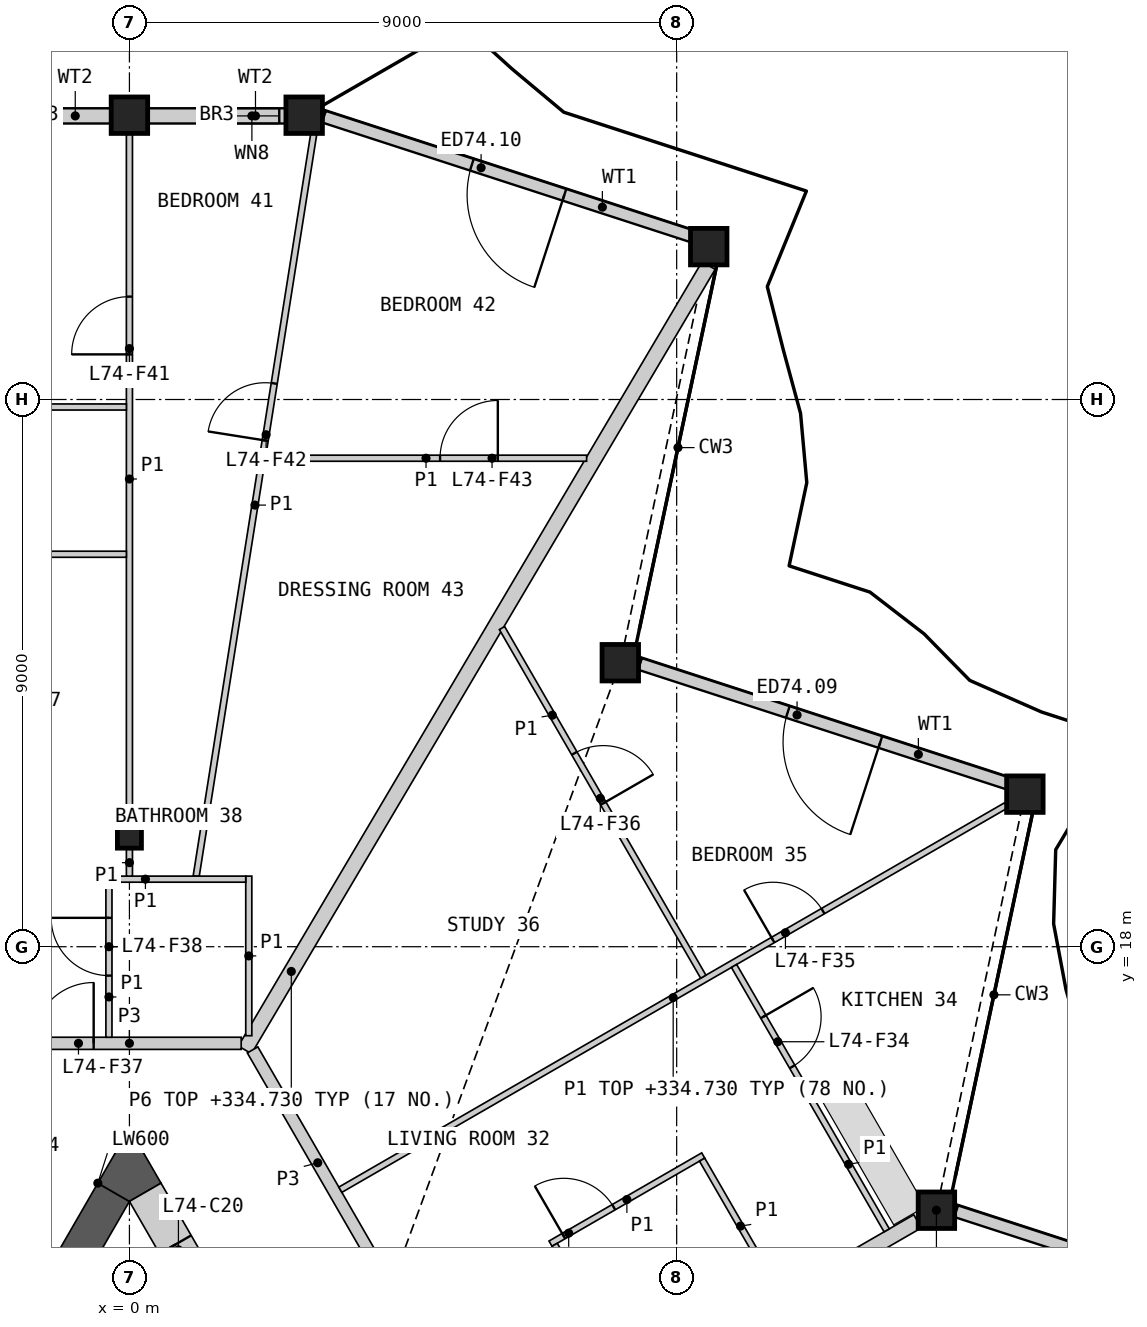
"""IFC4 building model, lengths in metres.
Left out: names, types, materials, properties, quantities, classifications, styles, units other than length and angle.
Written with IfcOpenShell. Run it as: python <this file> out.ifc"""

import sys

from ifc_helpers import new_model, si_unit, direction, frame, frame_2d, origin, origin_2d, place, context, subcontext, project, spatial, polyline, rectangle, hollow_rectangle, i_section, outline, extrude, element, fill, save


model = new_model("IFC4")
c1 = context("Model", 3, precision=1e-05, world=origin(), true_north=direction((0.0, 1.0)))
c2 = subcontext(c1, "Body", "Model", "MODEL_VIEW")
j1 = project(units=[si_unit("LENGTHUNIT", "METRE"), si_unit("PLANEANGLEUNIT", "RADIAN")], contexts=[c1])
p1 = place(None, origin())
s1 = spatial("IfcSite", under=j1, at=p1, CompositionType="ELEMENT")
p2 = place(p1, origin())
s2 = spatial("IfcBuilding", under=s1, at=p2, CompositionType="ELEMENT")
p3 = place(p2, frame((0.0, 0.0, 332.4)))
s3 = spatial("IfcBuildingStorey", under=s2, at=p3, CompositionType="ELEMENT", Elevation=332.4)
for number, where, z_axis, x_axis in (
    (1, (13.272, 13.666, 0.0), (0.0, 0.0, 1.0), (1.0, 0.0, 0.0)),
    (2, (14.727, 20.509, 0.0), (0.0, 0.0, 1.0), (1.0, 0.0, 0.0)),
    (3, (8.073, 22.671, 0.0), (0.0, 0.0, 1.0), (1.0, 0.0, 0.0)),
    (4, (9.527, 29.514, 0.0), (0.0, 0.0, 1.0), (1.0, 0.0, 0.0)),
    (5, (2.874, 31.676, 0.0), (0.0, 0.0, 1.0), (1.0, 0.0, 0.0)),
    (6, (0.0, 31.676, 0.0), (0.0, 0.0, 1.0), (1.0, 0.0, 0.0)),
):
    element("IfcColumn", number, at=place(p3, frame(where, z_axis=z_axis, x_axis=x_axis)), inside=s3, PredefinedType="COLUMN", context=c2, shape_type="SweptSolid", body=[
        extrude(hollow_rectangle(XDim=0.6, YDim=0.6, WallThickness=0.04, at=origin_2d()), origin(), (0.0, 0.0, 1.0), 3.4),
    ])
p4 = place(p3, frame((0.0, 19.811, 0.0), z_axis=(0.0, 0.0, 1.0), x_axis=(1.0, 0.0, 0.0)))
e7 = element("IfcColumn", 7, at=p4, inside=s3, PredefinedType="COLUMN", context=c2, shape_type="SweptSolid", body=[
    extrude(i_section(OverallWidth=0.396, OverallDepth=0.381, WebThickness=0.019, FlangeThickness=0.03, at=origin_2d()), origin(), (0.0, 0.0, 1.0), 3.4),
])
p5 = place(p3, frame((19.697, 11.667, 0.0), z_axis=(0.0, 0.0, 1.0), x_axis=(-0.951053926112, 0.309024966026, 0.0)))
e8 = element("IfcWall", 8, at=p5, inside=s3, PredefinedType="SOLIDWALL", context=c2, shape_type="SweptSolid", body=[
    extrude(rectangle(XDim=6.414, YDim=0.2, at=frame_2d((3.207, 0.0))), origin(), (0.0, 0.0, 1.0), 2.488),
])
p6 = place(p5, frame((2.262, 0.0, 0.0)))
e9 = element("IfcOpeningElement", 9, at=p6, cuts=e8, PredefinedType="OPENING", context=c2, shape_type="SweptSolid", body=[
    extrude(rectangle(XDim=1.6, YDim=2.25, at=frame_2d((0.8, 1.125))), frame((0.0, 0.11, 0.0), z_axis=(0.0, -1.0, 0.0), x_axis=(1.0, 0.0, 0.0)), (0.0, 0.0, 1.0), 0.22),
])
p7 = place(p3, frame((14.501, 20.667, 0.0), z_axis=(0.0, 0.0, 1.0), x_axis=(-0.951049165164, 0.309039617915, 0.0)))
e10 = element("IfcWall", 10, at=p7, inside=s3, PredefinedType="SOLIDWALL", context=c2, shape_type="SweptSolid", body=[
    extrude(rectangle(XDim=6.417, YDim=0.2, at=frame_2d((3.208, 0.0))), origin(), (0.0, 0.0, 1.0), 2.488),
])
p8 = place(p7, frame((2.262, 0.0, 0.0)))
e11 = element("IfcOpeningElement", 11, at=p8, cuts=e10, PredefinedType="OPENING", context=c2, shape_type="SweptSolid", body=[
    extrude(rectangle(XDim=1.6, YDim=2.25, at=frame_2d((0.8, 1.125))), frame((0.0, 0.11, 0.0), z_axis=(0.0, -1.0, 0.0), x_axis=(1.0, 0.0, 0.0)), (0.0, 0.0, 1.0), 0.22),
])
p9 = place(p3, frame((9.304, 29.668, 0.0), z_axis=(0.0, 0.0, 1.0), x_axis=(-0.951059216388, 0.309008684221, 0.0)))
e12 = element("IfcWall", 12, at=p9, inside=s3, PredefinedType="SOLIDWALL", context=c2, shape_type="SweptSolid", body=[
    extrude(rectangle(XDim=6.42, YDim=0.2, at=frame_2d((3.21, 0.0))), origin(), (0.0, 0.0, 1.0), 2.488),
])
p10 = place(p9, frame((2.262, 0.0, 0.0)))
e13 = element("IfcOpeningElement", 13, at=p10, cuts=e12, PredefinedType="OPENING", context=c2, shape_type="SweptSolid", body=[
    extrude(rectangle(XDim=1.6, YDim=2.25, at=frame_2d((0.8, 1.125))), frame((0.0, 0.11, 0.0), z_axis=(0.0, -1.0, 0.0), x_axis=(1.0, 0.0, 0.0)), (0.0, 0.0, 1.0), 0.22),
])
p11 = place(p3, frame((2.664, 31.664, 0.0), z_axis=(0.0, 0.0, 1.0), x_axis=(-1.0, 0.0, 0.0)))
e14 = element("IfcWall", 14, at=p11, inside=s3, PredefinedType="SOLIDWALL", context=c2, shape_type="SweptSolid", body=[
    extrude(rectangle(XDim=2.364, YDim=0.25, at=frame_2d((1.182, 0.0))), origin(), (0.0, 0.0, 1.0), 2.488),
])
p12 = place(p11, frame((0.2, 0.0, 1.5)))
e15 = element("IfcOpeningElement", 15, at=p12, cuts=e14, PredefinedType="OPENING", context=c2, shape_type="SweptSolid", body=[
    extrude(rectangle(XDim=0.9, YDim=0.7, at=frame_2d((0.45, 0.35))), frame((0.0, 0.135, 0.0), z_axis=(0.0, -1.0, 0.0), x_axis=(1.0, 0.0, 0.0)), (0.0, 0.0, 1.0), 0.27),
])
p13 = place(p3, frame((-0.3, 31.664, 0.0), z_axis=(0.0, 0.0, 1.0), x_axis=(-1.0, 0.0, 0.0)))
e16 = element("IfcWall", 16, at=p13, inside=s3, PredefinedType="SOLIDWALL", context=c2, shape_type="SweptSolid", body=[
    extrude(rectangle(XDim=2.364, YDim=0.25, at=frame_2d((1.182, 0.0))), origin(), (0.0, 0.0, 1.0), 2.488),
])
p14 = place(p3, frame((-0.26, 13.961, 0.0), z_axis=(0.0, 0.0, 1.0), x_axis=(-0.499980485389, -0.866036670257, 0.0)))
e17 = element("IfcWall", 17, at=p14, inside=s3, PredefinedType="SHEAR", context=c2, shape_type="SweptSolid", body=[
    extrude(rectangle(XDim=4.559, YDim=0.6, at=frame_2d((2.28, 0.0))), origin(), (0.0, 0.0, 1.0), 3.1),
])
p15 = place(p3, origin())
e18 = element("IfcWall", 18, at=p15, inside=s3, PredefinedType="SHEAR", context=c2, shape_type="SweptSolid", body=[
    extrude(outline(polyline([(-0.52, 14.111), (0.0, 15.011), (0.52, 14.111), (0.0, 13.811), (-0.52, 14.111)])), origin(), (0.0, 0.0, 1.0), 3.1),
])
p16 = place(p3, frame((1.556, 11.716, 0.0), z_axis=(0.0, 0.0, 1.0), x_axis=(-0.500018667571, 0.866014625789, 0.0)))
e19 = element("IfcWall", 19, at=p16, inside=s3, PredefinedType="SHEAR", context=c2, shape_type="SweptSolid", body=[
    extrude(rectangle(XDim=2.592, YDim=0.6, at=frame_2d((1.296, 0.0))), origin(), (0.0, 0.0, 1.0), 3.1),
])
p17 = place(p16, frame((0.6, 0.0, 0.0)))
e20 = element("IfcOpeningElement", 20, at=p17, cuts=e19, PredefinedType="OPENING", context=c2, shape_type="SweptSolid", body=[
    extrude(rectangle(XDim=1.0, YDim=2.1, at=frame_2d((0.5, 1.05))), frame((0.0, 0.31, 0.0), z_axis=(0.0, -1.0, 0.0), x_axis=(1.0, 0.0, 0.0)), (0.0, 0.0, 1.0), 0.62),
])
p18 = place(p3, frame((1.899, 16.303, 0.0), z_axis=(0.0, 0.0, 1.0), x_axis=(0.508895604687, 0.860828242758, 0.0)))
e21 = element("IfcWall", 21, at=p18, inside=s3, PredefinedType="PARTITIONING", context=c2, shape_type="SweptSolid", body=[
    extrude(rectangle(XDim=14.986, YDim=0.25, at=frame_2d((7.493, 0.0))), origin(), (0.0, 0.0, 1.0), 2.33),
])
p19 = place(p3, frame((6.067, 9.503, 0.0), z_axis=(0.0, 0.0, 1.0), x_axis=(0.866032392051, 0.499987895772, 0.0)))
e22 = element("IfcWall", 22, at=p19, inside=s3, PredefinedType="PARTITIONING", context=c2, shape_type="SweptSolid", body=[
    extrude(rectangle(XDim=7.962, YDim=0.25, at=frame_2d((3.981, 0.0))), origin(), (0.0, 0.0, 1.0), 2.33),
])
p20 = place(p3, frame((2.025, 16.303, 0.0), z_axis=(0.0, 0.0, 1.0), x_axis=(0.499978750566, -0.866037671803, 0.0)))
e23 = element("IfcWall", 23, at=p20, inside=s3, PredefinedType="PARTITIONING", context=c2, shape_type="SweptSolid", body=[
    extrude(rectangle(XDim=4.288, YDim=0.2, at=frame_2d((2.144, 0.0))), origin(), (0.0, 0.0, 1.0), 3.1),
])
p21 = place(p3, frame((-1.838, 16.411, 0.0), z_axis=(0.0, 0.0, 1.0), x_axis=(1.0, 0.0, 0.0)))
e24 = element("IfcWall", 24, at=p21, inside=s3, PredefinedType="PARTITIONING", context=c2, shape_type="SweptSolid", body=[
    extrude(rectangle(XDim=3.676, YDim=0.2, at=frame_2d((1.838, 0.0))), origin(), (0.0, 0.0, 1.0), 3.1),
])
p22 = place(p21, frame((0.25, 0.0, 0.0)))
e25 = element("IfcOpeningElement", 25, at=p22, cuts=e24, PredefinedType="OPENING", context=c2, shape_type="SweptSolid", body=[
    extrude(rectangle(XDim=1.0, YDim=2.1, at=frame_2d((0.5, 1.05))), frame((0.0, 0.11, 0.0), z_axis=(0.0, -1.0, 0.0), x_axis=(1.0, 0.0, 0.0)), (0.0, 0.0, 1.0), 0.22),
])
p23 = place(p3, frame((3.469, 14.003, 0.0), z_axis=(0.0, 0.0, 1.0), x_axis=(0.866021563384, 0.50000665171, 0.0)))
e26 = element("IfcWall", 26, at=p23, inside=s3, PredefinedType="PARTITIONING", context=c2, shape_type="SweptSolid", body=[
    extrude(rectangle(XDim=12.641, YDim=0.1, at=frame_2d((6.321, 0.0))), origin(), (0.0, 0.0, 1.0), 2.33),
])
p24 = place(p23, frame((8.215, 0.0, 0.0)))
e27 = element("IfcOpeningElement", 27, at=p24, cuts=e26, PredefinedType="OPENING", context=c2, shape_type="SweptSolid", body=[
    extrude(rectangle(XDim=0.95, YDim=2.1, at=frame_2d((0.475, 1.05))), frame((0.0, 0.06, 0.0), z_axis=(0.0, -1.0, 0.0), x_axis=(1.0, 0.0, 0.0)), (0.0, 0.0, 1.0), 0.12),
])
p25 = place(p3, frame((1.098, 19.16, 0.0), z_axis=(0.0, 0.0, 1.0), x_axis=(0.156426176129, 0.987689653394, 0.0)))
e28 = element("IfcWall", 28, at=p25, inside=s3, PredefinedType="PARTITIONING", context=c2, shape_type="SweptSolid", body=[
    extrude(rectangle(XDim=12.358, YDim=0.1, at=frame_2d((6.179, 0.0))), origin(), (0.0, 0.0, 1.0), 2.33),
])
p26 = place(p25, frame((7.255, 0.0, 0.0)))
e29 = element("IfcOpeningElement", 29, at=p26, cuts=e28, PredefinedType="OPENING", context=c2, shape_type="SweptSolid", body=[
    extrude(rectangle(XDim=0.95, YDim=2.1, at=frame_2d((0.475, 1.05))), frame((0.0, 0.06, 0.0), z_axis=(0.0, -1.0, 0.0), x_axis=(1.0, 0.0, 0.0)), (0.0, 0.0, 1.0), 0.12),
])
p27 = place(p3, frame((0.0, 20.019, 0.0), z_axis=(0.0, 0.0, 1.0), x_axis=(0.0, 1.0, 0.0)))
e30 = element("IfcWall", 30, at=p27, inside=s3, PredefinedType="PARTITIONING", context=c2, shape_type="SweptSolid", body=[
    extrude(rectangle(XDim=11.347, YDim=0.1, at=frame_2d((5.674, 0.0))), origin(), (0.0, 0.0, 1.0), 2.33),
])
p28 = place(p27, frame((7.723, 0.0, 0.0)))
e31 = element("IfcOpeningElement", 31, at=p28, cuts=e30, PredefinedType="OPENING", context=c2, shape_type="SweptSolid", body=[
    extrude(rectangle(XDim=0.95, YDim=2.1, at=frame_2d((0.475, 1.05))), frame((0.0, 0.06, 0.0), z_axis=(0.0, -1.0, 0.0), x_axis=(1.0, 0.0, 0.0)), (0.0, 0.0, 1.0), 0.12),
])
p29 = place(p3, frame((-8.005, 26.877, 0.0), z_axis=(0.0, 0.0, 1.0), x_axis=(1.0, 0.0, 0.0)))
e32 = element("IfcWall", 32, at=p29, inside=s3, PredefinedType="PARTITIONING", context=c2, shape_type="SweptSolid", body=[
    extrude(rectangle(XDim=7.955, YDim=0.1, at=frame_2d((3.978, 0.0))), origin(), (0.0, 0.0, 1.0), 2.33),
])
p30 = place(p29, frame((3.853, 0.0, 0.0)))
e33 = element("IfcOpeningElement", 33, at=p30, cuts=e32, PredefinedType="OPENING", context=c2, shape_type="SweptSolid", body=[
    extrude(rectangle(XDim=0.95, YDim=2.1, at=frame_2d((0.475, 1.05))), frame((0.0, 0.06, 0.0), z_axis=(0.0, -1.0, 0.0), x_axis=(1.0, 0.0, 0.0)), (0.0, 0.0, 1.0), 0.12),
])
p31 = place(p3, frame((6.127, 23.241, 0.0), z_axis=(0.0, 0.0, 1.0), x_axis=(0.500021410345, -0.866013042163, 0.0)))
e34 = element("IfcWall", 34, at=p31, inside=s3, PredefinedType="PARTITIONING", context=c2, shape_type="SweptSolid", body=[
    extrude(rectangle(XDim=6.621, YDim=0.1, at=frame_2d((3.311, 0.0))), origin(), (0.0, 0.0, 1.0), 2.33),
])
p32 = place(p31, frame((2.379, 0.0, 0.0)))
e35 = element("IfcOpeningElement", 35, at=p32, cuts=e34, PredefinedType="OPENING", context=c2, shape_type="SweptSolid", body=[
    extrude(rectangle(XDim=0.95, YDim=2.1, at=frame_2d((0.475, 1.05))), frame((0.0, 0.06, 0.0), z_axis=(0.0, -1.0, 0.0), x_axis=(1.0, 0.0, 0.0)), (0.0, 0.0, 1.0), 0.12),
])
p33 = place(p3, frame((-6.607, 24.455, 0.0), z_axis=(0.0, 0.0, 1.0), x_axis=(1.0, 0.0, 0.0)))
e36 = element("IfcWall", 36, at=p33, inside=s3, PredefinedType="PARTITIONING", context=c2, shape_type="SweptSolid", body=[
    extrude(rectangle(XDim=6.557, YDim=0.1, at=frame_2d((3.279, 0.0))), origin(), (0.0, 0.0, 1.0), 2.33),
])
p34 = place(p33, frame((3.555, 0.0, 0.0)))
e37 = element("IfcOpeningElement", 37, at=p34, cuts=e36, PredefinedType="OPENING", context=c2, shape_type="SweptSolid", body=[
    extrude(rectangle(XDim=0.95, YDim=2.1, at=frame_2d((0.475, 1.05))), frame((0.0, 0.06, 0.0), z_axis=(0.0, -1.0, 0.0), x_axis=(1.0, 0.0, 0.0)), (0.0, 0.0, 1.0), 0.12),
])
p35 = place(p3, frame((2.237, 26.034, 0.0), z_axis=(0.0, 0.0, 1.0), x_axis=(1.0, 0.0, 0.0)))
e38 = element("IfcWall", 38, at=p35, inside=s3, PredefinedType="PARTITIONING", context=c2, shape_type="SweptSolid", body=[
    extrude(rectangle(XDim=5.282, YDim=0.1, at=frame_2d((2.641, 0.0))), origin(), (0.0, 0.0, 1.0), 2.33),
])
p36 = place(p35, frame((2.872, 0.0, 0.0)))
e39 = element("IfcOpeningElement", 39, at=p36, cuts=e38, PredefinedType="OPENING", context=c2, shape_type="SweptSolid", body=[
    extrude(rectangle(XDim=0.95, YDim=2.1, at=frame_2d((0.475, 1.05))), frame((0.0, 0.06, 0.0), z_axis=(0.0, -1.0, 0.0), x_axis=(1.0, 0.0, 0.0)), (0.0, 0.0, 1.0), 0.12),
])
p37 = place(p3, frame((9.944, 17.684, 0.0), z_axis=(0.0, 0.0, 1.0), x_axis=(0.499972176429, -0.866041467135, 0.0)))
e40 = element("IfcWall", 40, at=p37, inside=s3, PredefinedType="PARTITIONING", context=c2, shape_type="SweptSolid", body=[
    extrude(rectangle(XDim=5.021, YDim=0.1, at=frame_2d((2.511, 0.0))), origin(), (0.0, 0.0, 1.0), 2.33),
])
p38 = place(p37, frame((0.964, 0.0, 0.0)))
e41 = element("IfcOpeningElement", 41, at=p38, cuts=e40, PredefinedType="OPENING", context=c2, shape_type="SweptSolid", body=[
    extrude(rectangle(XDim=0.95, YDim=2.1, at=frame_2d((0.475, 1.05))), frame((0.0, 0.06, 0.0), z_axis=(0.0, -1.0, 0.0), x_axis=(1.0, 0.0, 0.0)), (0.0, 0.0, 1.0), 0.12),
])
p39 = place(p3, frame((6.925, 13.116, 0.0), z_axis=(0.0, 0.0, 1.0), x_axis=(0.866032775405, 0.499987231761, 0.0)))
e42 = element("IfcWall", 42, at=p39, inside=s3, PredefinedType="PARTITIONING", context=c2, shape_type="SweptSolid", body=[
    extrude(rectangle(XDim=2.9, YDim=0.1, at=frame_2d((1.45, 0.0))), origin(), (0.0, 0.0, 1.0), 2.33),
])
p40 = place(p39, frame((0.25, 0.0, 0.0)))
e43 = element("IfcOpeningElement", 43, at=p40, cuts=e42, PredefinedType="OPENING", context=c2, shape_type="SweptSolid", body=[
    extrude(rectangle(XDim=0.95, YDim=2.1, at=frame_2d((0.475, 1.05))), frame((0.0, 0.06, 0.0), z_axis=(0.0, -1.0, 0.0), x_axis=(1.0, 0.0, 0.0)), (0.0, 0.0, 1.0), 0.12),
])
p41 = place(p3, frame((-0.337, 16.511, 0.0), z_axis=(0.0, 0.0, 1.0), x_axis=(0.0, 1.0, 0.0)))
e44 = element("IfcWall", 44, at=p41, inside=s3, PredefinedType="PARTITIONING", context=c2, shape_type="SweptSolid", body=[
    extrude(rectangle(XDim=2.65, YDim=0.1, at=frame_2d((1.325, 0.0))), origin(), (0.0, 0.0, 1.0), 2.33),
])
p42 = place(p41, frame((1.014, 0.0, 0.0)))
e45 = element("IfcOpeningElement", 45, at=p42, cuts=e44, PredefinedType="OPENING", context=c2, shape_type="SweptSolid", body=[
    extrude(rectangle(XDim=0.95, YDim=2.1, at=frame_2d((0.475, 1.05))), frame((0.0, 0.06, 0.0), z_axis=(0.0, -1.0, 0.0), x_axis=(1.0, 0.0, 0.0)), (0.0, 0.0, 1.0), 0.12),
])
p43 = place(p3, frame((1.963, 16.536, 0.0), z_axis=(0.0, 0.0, 1.0), x_axis=(0.0, 1.0, 0.0)))
e46 = element("IfcWall", 46, at=p43, inside=s3, PredefinedType="PARTITIONING", context=c2, shape_type="SweptSolid", body=[
    extrude(rectangle(XDim=2.625, YDim=0.1, at=frame_2d((1.312, 0.0))), origin(), (0.0, 0.0, 1.0), 2.33),
])
for number, where, z_axis, x_axis in (
    (47, (9.418, 14.498, 0.0), (0.0, 0.0, 1.0), (0.5, -0.866, 0.0)),
    (48, (6.994, 13.098, 0.0), (0.0, 0.0, 1.0), (0.5, -0.866, 0.0)),
):
    element("IfcWall", number, at=place(p3, frame(where, z_axis=z_axis, x_axis=x_axis)), inside=s3, PredefinedType="PARTITIONING", context=c2, shape_type="SweptSolid", body=[
        extrude(rectangle(XDim=2.525, YDim=0.1, at=frame_2d((1.262, 0.0))), origin(), (0.0, 0.0, 1.0), 2.33),
    ])
p44 = place(p3, frame((-0.287, 19.111, 0.0), z_axis=(0.0, 0.0, 1.0), x_axis=(1.0, 0.0, 0.0)))
e49 = element("IfcWall", 49, at=p44, inside=s3, PredefinedType="PARTITIONING", context=c2, shape_type="SweptSolid", body=[
    extrude(rectangle(XDim=2.2, YDim=0.1, at=frame_2d((1.1, 0.0))), origin(), (0.0, 0.0, 1.0), 2.33),
])
p45 = place(p3, frame((0.0, 19.161, 0.0), z_axis=(0.0, 0.0, 1.0), x_axis=(0.0, 1.0, 0.0)))
e50 = element("IfcWall", 50, at=p45, inside=s3, PredefinedType="PARTITIONING", context=c2, shape_type="SweptSolid", body=[
    extrude(rectangle(XDim=0.442, YDim=0.1, at=frame_2d((0.221, 0.0))), origin(), (0.0, 0.0, 1.0), 2.33),
])
p46 = place(p8, origin())
e51 = element("IfcDoor", 51, at=p46, inside=s3, OperationType="DOUBLE_DOOR_SINGLE_SWING", PredefinedType="DOOR", context=c2, shape_type="SweptSolid", body=[
    extrude(rectangle(XDim=1.6, YDim=2.25, at=frame_2d((0.8, 1.125))), frame((0.0, 0.025, 0.0), z_axis=(0.0, -1.0, 0.0), x_axis=(1.0, 0.0, 0.0)), (0.0, 0.0, 1.0), 0.05),
])
fill(e11, e51)
p47 = place(p10, origin())
e52 = element("IfcDoor", 52, at=p47, inside=s3, OperationType="DOUBLE_DOOR_SINGLE_SWING", PredefinedType="DOOR", context=c2, shape_type="SweptSolid", body=[
    extrude(rectangle(XDim=1.6, YDim=2.25, at=frame_2d((0.8, 1.125))), frame((0.0, 0.025, 0.0), z_axis=(0.0, -1.0, 0.0), x_axis=(1.0, 0.0, 0.0)), (0.0, 0.0, 1.0), 0.05),
])
fill(e13, e52)
p48 = place(p12, origin())
e53 = element("IfcWindow", 53, at=p48, inside=s3, PartitioningType="SINGLE_PANEL", PredefinedType="WINDOW", context=c2, shape_type="SweptSolid", body=[
    extrude(rectangle(XDim=0.9, YDim=0.7, at=frame_2d((0.45, 0.35))), frame((0.0, 0.03, 0.0), z_axis=(0.0, -1.0, 0.0), x_axis=(1.0, 0.0, 0.0)), (0.0, 0.0, 1.0), 0.06),
])
fill(e15, e53)
p49 = place(p17, origin())
e54 = element("IfcDoor", 54, at=p49, inside=s3, OperationType="SINGLE_SWING_RIGHT", PredefinedType="DOOR", context=c2, shape_type="SweptSolid", body=[
    extrude(rectangle(XDim=1.0, YDim=2.1, at=frame_2d((0.5, 1.05))), frame((0.0, 0.055, 0.0), z_axis=(0.0, -1.0, 0.0), x_axis=(1.0, 0.0, 0.0)), (0.0, 0.0, 1.0), 0.05),
])
fill(e20, e54)
p50 = place(p40, origin())
e55 = element("IfcDoor", 55, at=p50, inside=s3, OperationType="SINGLE_SWING_LEFT", PredefinedType="DOOR", context=c2, shape_type="SweptSolid", body=[
    extrude(rectangle(XDim=0.95, YDim=2.1, at=frame_2d((0.475, 1.05))), frame((0.0, 0.025, 0.0), z_axis=(0.0, -1.0, 0.0), x_axis=(1.0, 0.0, 0.0)), (0.0, 0.0, 1.0), 0.05),
])
fill(e43, e55)
p51 = place(p38, origin())
e56 = element("IfcDoor", 56, at=p51, inside=s3, OperationType="SINGLE_SWING_LEFT", PredefinedType="DOOR", context=c2, shape_type="SweptSolid", body=[
    extrude(rectangle(XDim=0.95, YDim=2.1, at=frame_2d((0.475, 1.05))), frame((0.0, 0.025, 0.0), z_axis=(0.0, -1.0, 0.0), x_axis=(1.0, 0.0, 0.0)), (0.0, 0.0, 1.0), 0.05),
])
fill(e41, e56)
p52 = place(p24, origin())
e57 = element("IfcDoor", 57, at=p52, inside=s3, OperationType="SINGLE_SWING_LEFT", PredefinedType="DOOR", context=c2, shape_type="SweptSolid", body=[
    extrude(rectangle(XDim=0.95, YDim=2.1, at=frame_2d((0.475, 1.05))), frame((0.0, 0.025, 0.0), z_axis=(0.0, -1.0, 0.0), x_axis=(1.0, 0.0, 0.0)), (0.0, 0.0, 1.0), 0.05),
])
fill(e27, e57)
p53 = place(p32, origin())
e58 = element("IfcDoor", 58, at=p53, inside=s3, OperationType="SINGLE_SWING_RIGHT", PredefinedType="DOOR", context=c2, shape_type="SweptSolid", body=[
    extrude(rectangle(XDim=0.95, YDim=2.1, at=frame_2d((0.475, 1.05))), frame((0.0, 0.025, 0.0), z_axis=(0.0, -1.0, 0.0), x_axis=(1.0, 0.0, 0.0)), (0.0, 0.0, 1.0), 0.05),
])
fill(e35, e58)
p54 = place(p22, origin())
e59 = element("IfcDoor", 59, at=p54, inside=s3, OperationType="SINGLE_SWING_RIGHT", PredefinedType="DOOR", context=c2, shape_type="SweptSolid", body=[
    extrude(rectangle(XDim=1.0, YDim=2.1, at=frame_2d((0.5, 1.05))), frame((0.0, 0.025, 0.0), z_axis=(0.0, -1.0, 0.0), x_axis=(1.0, 0.0, 0.0)), (0.0, 0.0, 1.0), 0.05),
])
fill(e25, e59)
p55 = place(p42, origin())
e60 = element("IfcDoor", 60, at=p55, inside=s3, OperationType="SINGLE_SWING_RIGHT", PredefinedType="DOOR", context=c2, shape_type="SweptSolid", body=[
    extrude(rectangle(XDim=0.95, YDim=2.1, at=frame_2d((0.475, 1.05))), frame((0.0, 0.025, 0.0), z_axis=(0.0, -1.0, 0.0), x_axis=(1.0, 0.0, 0.0)), (0.0, 0.0, 1.0), 0.05),
])
fill(e45, e60)
p56 = place(p28, origin())
e61 = element("IfcDoor", 61, at=p56, inside=s3, OperationType="SINGLE_SWING_LEFT", PredefinedType="DOOR", context=c2, shape_type="SweptSolid", body=[
    extrude(rectangle(XDim=0.95, YDim=2.1, at=frame_2d((0.475, 1.05))), frame((0.0, 0.025, 0.0), z_axis=(0.0, -1.0, 0.0), x_axis=(1.0, 0.0, 0.0)), (0.0, 0.0, 1.0), 0.05),
])
fill(e31, e61)
p57 = place(p26, origin())
e62 = element("IfcDoor", 62, at=p57, inside=s3, OperationType="SINGLE_SWING_LEFT", PredefinedType="DOOR", context=c2, shape_type="SweptSolid", body=[
    extrude(rectangle(XDim=0.95, YDim=2.1, at=frame_2d((0.475, 1.05))), frame((0.0, 0.025, 0.0), z_axis=(0.0, -1.0, 0.0), x_axis=(1.0, 0.0, 0.0)), (0.0, 0.0, 1.0), 0.05),
])
fill(e29, e62)
p58 = place(p36, origin())
e63 = element("IfcDoor", 63, at=p58, inside=s3, OperationType="SINGLE_SWING_RIGHT", PredefinedType="DOOR", context=c2, shape_type="SweptSolid", body=[
    extrude(rectangle(XDim=0.95, YDim=2.1, at=frame_2d((0.475, 1.05))), frame((0.0, 0.025, 0.0), z_axis=(0.0, -1.0, 0.0), x_axis=(1.0, 0.0, 0.0)), (0.0, 0.0, 1.0), 0.05),
])
fill(e39, e63)
save(model, sys.argv[1])
